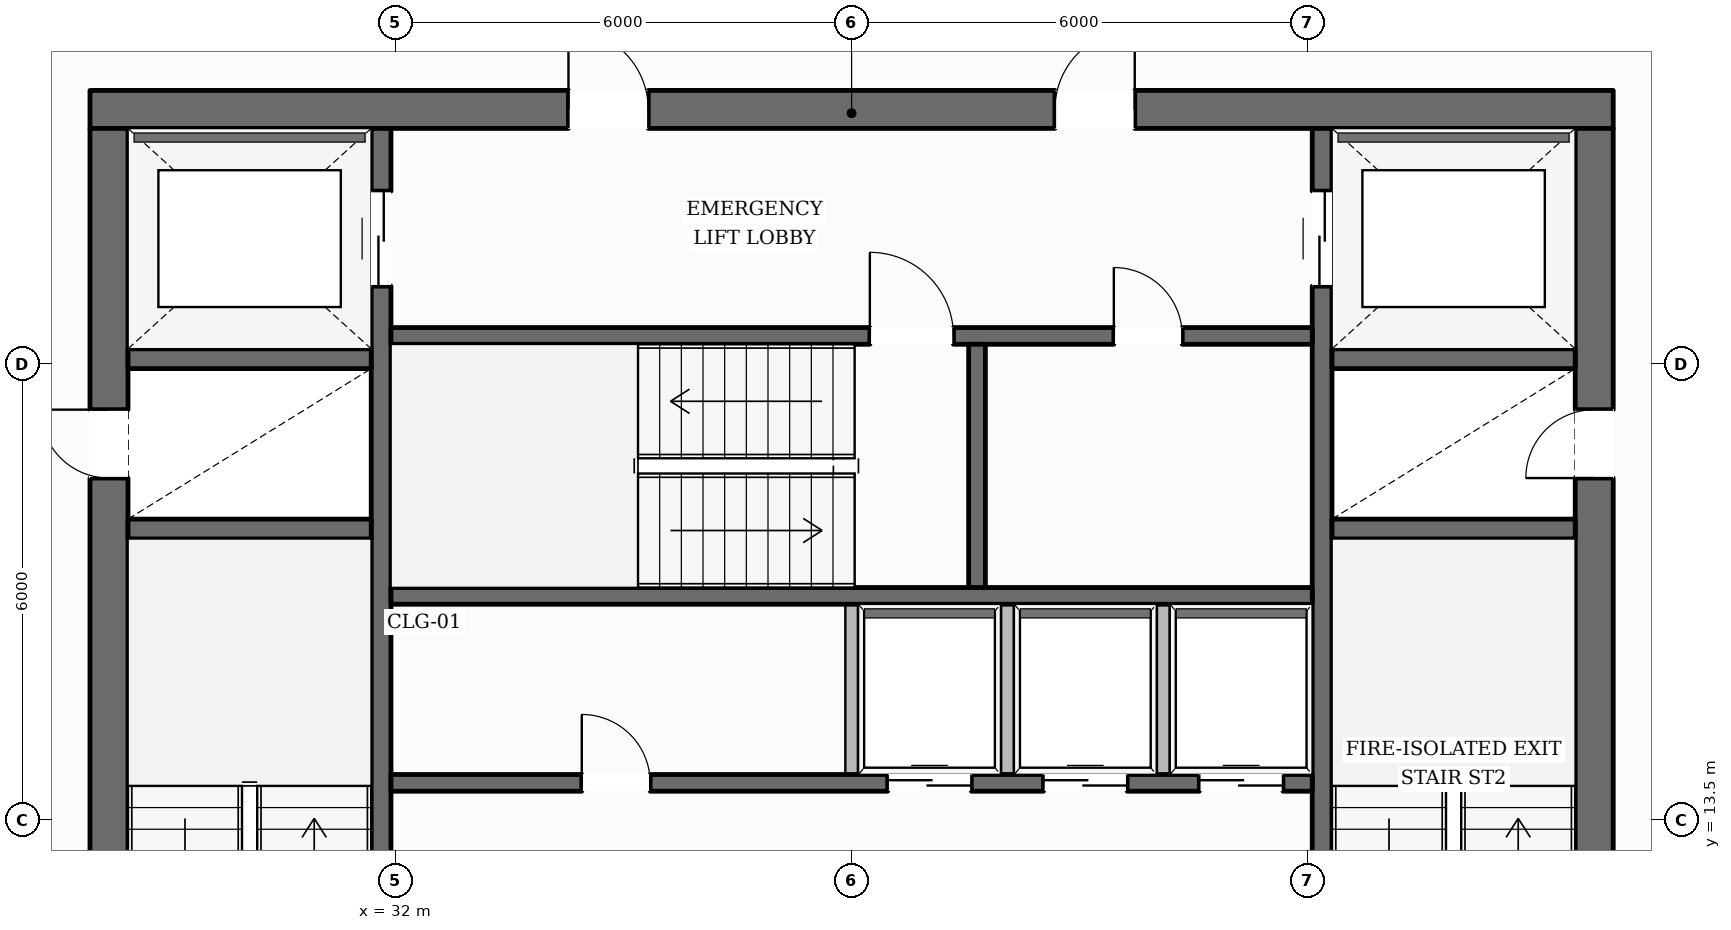
"""IFC4 building model, lengths in metres.
Left out: names, types, materials, properties, quantities, classifications, styles, units other than length and angle.
Written with IfcOpenShell. Run it as: python <this file> out.ifc"""

import sys

from ifc_helpers import new_model, si_unit, direction, frame, frame_2d, origin, place, context, subcontext, project, spatial, rectangle, extrude, element, fill, save


model = new_model("IFC4")
c1 = context("Model", 3, precision=1e-05, world=origin(), true_north=direction((0.0, 1.0)))
c2 = subcontext(c1, "Body", "Model", "MODEL_VIEW")
j1 = project(units=[si_unit("LENGTHUNIT", "METRE"), si_unit("PLANEANGLEUNIT", "RADIAN")], contexts=[c1])
p1 = place(None, origin())
s1 = spatial("IfcSite", under=j1, at=p1, CompositionType="ELEMENT")
p2 = place(p1, origin())
s2 = spatial("IfcBuilding", under=s1, at=p2, CompositionType="ELEMENT")
p3 = place(p2, frame((0.0, 0.0, 127.85)))
s3 = spatial("IfcBuildingStorey", under=s2, at=p3, CompositionType="ELEMENT", Elevation=127.85)
p4 = place(p3, frame((27.98, 22.85, 0.0), z_axis=(0.0, 0.0, 1.0), x_axis=(1.0, 0.0, 0.0)))
e1 = element("IfcWall", 1, at=p4, inside=s3, PredefinedType="SOLIDWALL", context=c2, shape_type="SweptSolid", body=[
    extrude(rectangle(XDim=20.04, YDim=0.5, at=frame_2d((10.02, 0.0))), origin(), (0.0, 0.0, 1.0), 3.6),
])
p5 = place(p4, frame((6.295, 0.0, 0.0)))
e2 = element("IfcOpeningElement", 2, at=p5, cuts=e1, PredefinedType="OPENING", context=c2, shape_type="SweptSolid", body=[
    extrude(rectangle(XDim=1.05, YDim=2.15, at=frame_2d((0.525, 1.075))), frame((0.0, 0.26, 0.0), z_axis=(0.0, -1.0, 0.0), x_axis=(1.0, 0.0, 0.0)), (0.0, 0.0, 1.0), 0.52),
])
p6 = place(p4, frame((12.695, 0.0, 0.0)))
e3 = element("IfcOpeningElement", 3, at=p6, cuts=e1, PredefinedType="OPENING", context=c2, shape_type="SweptSolid", body=[
    extrude(rectangle(XDim=1.05, YDim=2.15, at=frame_2d((0.525, 1.075))), frame((0.0, 0.26, 0.0), z_axis=(0.0, -1.0, 0.0), x_axis=(1.0, 0.0, 0.0)), (0.0, 0.0, 1.0), 0.52),
])
p7 = place(p3, frame((28.23, 9.6, 0.0), z_axis=(0.0, 0.0, 1.0), x_axis=(0.0, 1.0, 0.0)))
e4 = element("IfcWall", 4, at=p7, inside=s3, PredefinedType="SOLIDWALL", context=c2, shape_type="SweptSolid", body=[
    extrude(rectangle(XDim=13.0, YDim=0.5, at=frame_2d((6.5, 0.0))), origin(), (0.0, 0.0, 1.0), 3.6),
])
p8 = place(p7, frame((0.2, 0.0, 0.0)))
e5 = element("IfcOpeningElement", 5, at=p8, cuts=e4, PredefinedType="OPENING", context=c2, shape_type="SweptSolid", body=[
    extrude(rectangle(XDim=1.1, YDim=2.15, at=frame_2d((0.55, 1.075))), frame((0.0, 0.26, 0.0), z_axis=(0.0, -1.0, 0.0), x_axis=(1.0, 0.0, 0.0)), (0.0, 0.0, 1.0), 0.52),
])
p9 = place(p7, frame((8.4, 0.0, 0.0)))
e6 = element("IfcOpeningElement", 6, at=p9, cuts=e4, PredefinedType="OPENING", context=c2, shape_type="SweptSolid", body=[
    extrude(rectangle(XDim=0.9, YDim=2.1, at=frame_2d((0.45, 1.05))), frame((0.0, 0.26, 0.0), z_axis=(0.0, -1.0, 0.0), x_axis=(1.0, 0.0, 0.0)), (0.0, 0.0, 1.0), 0.52),
])
p10 = place(p3, frame((47.77, 9.6, 0.0), z_axis=(0.0, 0.0, 1.0), x_axis=(0.0, 1.0, 0.0)))
e7 = element("IfcWall", 7, at=p10, inside=s3, PredefinedType="SOLIDWALL", context=c2, shape_type="SweptSolid", body=[
    extrude(rectangle(XDim=13.0, YDim=0.5, at=frame_2d((6.5, 0.0))), origin(), (0.0, 0.0, 1.0), 3.6),
])
p11 = place(p10, frame((0.2, 0.0, 0.0)))
e8 = element("IfcOpeningElement", 8, at=p11, cuts=e7, PredefinedType="OPENING", context=c2, shape_type="SweptSolid", body=[
    extrude(rectangle(XDim=1.1, YDim=2.15, at=frame_2d((0.55, 1.075))), frame((0.0, 0.26, 0.0), z_axis=(0.0, -1.0, 0.0), x_axis=(1.0, 0.0, 0.0)), (0.0, 0.0, 1.0), 0.52),
])
p12 = place(p10, frame((8.4, 0.0, 0.0)))
e9 = element("IfcOpeningElement", 9, at=p12, cuts=e7, PredefinedType="OPENING", context=c2, shape_type="SweptSolid", body=[
    extrude(rectangle(XDim=0.9, YDim=2.1, at=frame_2d((0.45, 1.05))), frame((0.0, 0.26, 0.0), z_axis=(0.0, -1.0, 0.0), x_axis=(1.0, 0.0, 0.0)), (0.0, 0.0, 1.0), 0.52),
])
p13 = place(p3, frame((31.81, 9.6, 0.0), z_axis=(0.0, 0.0, 1.0), x_axis=(0.0, 1.0, 0.0)))
e10 = element("IfcWall", 10, at=p13, inside=s3, PredefinedType="SHEAR", context=c2, shape_type="SweptSolid", body=[
    extrude(rectangle(XDim=13.0, YDim=0.26, at=frame_2d((6.5, 0.0))), origin(), (0.0, 0.0, 1.0), 3.6),
])
p14 = place(p13, frame((10.925, 0.0, 0.0)))
e11 = element("IfcOpeningElement", 11, at=p14, cuts=e10, PredefinedType="OPENING", context=c2, shape_type="SweptSolid", body=[
    extrude(rectangle(XDim=1.25, YDim=2.25, at=frame_2d((0.625, 1.125))), frame((0.0, 0.14, 0.0), z_axis=(0.0, -1.0, 0.0), x_axis=(1.0, 0.0, 0.0)), (0.0, 0.0, 1.0), 0.28),
])
p15 = place(p3, frame((44.19, 9.6, 0.0), z_axis=(0.0, 0.0, 1.0), x_axis=(0.0, 1.0, 0.0)))
e12 = element("IfcWall", 12, at=p15, inside=s3, PredefinedType="SHEAR", context=c2, shape_type="SweptSolid", body=[
    extrude(rectangle(XDim=13.0, YDim=0.26, at=frame_2d((6.5, 0.0))), origin(), (0.0, 0.0, 1.0), 3.6),
])
p16 = place(p15, frame((10.925, 0.0, 0.0)))
e13 = element("IfcOpeningElement", 13, at=p16, cuts=e12, PredefinedType="OPENING", context=c2, shape_type="SweptSolid", body=[
    extrude(rectangle(XDim=1.25, YDim=2.25, at=frame_2d((0.625, 1.125))), frame((0.0, 0.14, 0.0), z_axis=(0.0, -1.0, 0.0), x_axis=(1.0, 0.0, 0.0)), (0.0, 0.0, 1.0), 0.28),
])
for number, where, z_axis, x_axis in (
    (14, (28.48, 17.33, 0.0), (0.0, 0.0, 1.0), (1.0, 0.0, 0.0)),
    (15, (28.48, 19.57, 0.0), (0.0, 0.0, 1.0), (1.0, 0.0, 0.0)),
    (16, (44.32, 17.33, 0.0), (0.0, 0.0, 1.0), (1.0, 0.0, 0.0)),
    (17, (44.32, 19.57, 0.0), (0.0, 0.0, 1.0), (1.0, 0.0, 0.0)),
):
    element("IfcWall", number, at=place(p3, frame(where, z_axis=z_axis, x_axis=x_axis)), inside=s3, PredefinedType="SHEAR", context=c2, shape_type="SweptSolid", body=[
        extrude(rectangle(XDim=3.2, YDim=0.26, at=frame_2d((1.6, 0.0))), origin(), (0.0, 0.0, 1.0), 3.6),
    ])
p17 = place(p3, frame((31.94, 19.87, 0.0), z_axis=(0.0, 0.0, 1.0), x_axis=(1.0, 0.0, 0.0)))
e18 = element("IfcWall", 18, at=p17, inside=s3, PredefinedType="SOLIDWALL", context=c2, shape_type="SweptSolid", body=[
    extrude(rectangle(XDim=12.12, YDim=0.22, at=frame_2d((6.06, 0.0))), origin(), (0.0, 0.0, 1.0), 3.6),
])
p18 = place(p17, frame((6.3, 0.0, 0.0)))
e19 = element("IfcOpeningElement", 19, at=p18, cuts=e18, PredefinedType="OPENING", context=c2, shape_type="SweptSolid", body=[
    extrude(rectangle(XDim=1.1, YDim=2.15, at=frame_2d((0.55, 1.075))), frame((0.0, 0.12, 0.0), z_axis=(0.0, -1.0, 0.0), x_axis=(1.0, 0.0, 0.0)), (0.0, 0.0, 1.0), 0.24),
])
p19 = place(p17, frame((9.51, 0.0, 0.0)))
e20 = element("IfcOpeningElement", 20, at=p19, cuts=e18, PredefinedType="OPENING", context=c2, shape_type="SweptSolid", body=[
    extrude(rectangle(XDim=0.9, YDim=2.1, at=frame_2d((0.45, 1.05))), frame((0.0, 0.12, 0.0), z_axis=(0.0, -1.0, 0.0), x_axis=(1.0, 0.0, 0.0)), (0.0, 0.0, 1.0), 0.24),
])
p20 = place(p3, frame((31.94, 16.45, 0.0), z_axis=(0.0, 0.0, 1.0), x_axis=(1.0, 0.0, 0.0)))
e21 = element("IfcWall", 21, at=p20, inside=s3, PredefinedType="SOLIDWALL", context=c2, shape_type="SweptSolid", body=[
    extrude(rectangle(XDim=12.12, YDim=0.22, at=frame_2d((6.06, 0.0))), origin(), (0.0, 0.0, 1.0), 3.6),
])
p21 = place(p3, frame((39.65, 16.56, 0.0), z_axis=(0.0, 0.0, 1.0), x_axis=(0.0, 1.0, 0.0)))
e22 = element("IfcWall", 22, at=p21, inside=s3, PredefinedType="SOLIDWALL", context=c2, shape_type="SweptSolid", body=[
    extrude(rectangle(XDim=3.2, YDim=0.22, at=frame_2d((1.6, 0.0))), origin(), (0.0, 0.0, 1.0), 3.6),
])
p22 = place(p3, frame((31.94, 13.99, 0.0), z_axis=(0.0, 0.0, 1.0), x_axis=(1.0, 0.0, 0.0)))
e23 = element("IfcWall", 23, at=p22, inside=s3, PredefinedType="SOLIDWALL", context=c2, shape_type="SweptSolid", body=[
    extrude(rectangle(XDim=12.12, YDim=0.22, at=frame_2d((6.06, 0.0))), origin(), (0.0, 0.0, 1.0), 3.6),
])
p23 = place(p22, frame((2.51, 0.0, 0.0)))
e24 = element("IfcOpeningElement", 24, at=p23, cuts=e23, PredefinedType="OPENING", context=c2, shape_type="SweptSolid", body=[
    extrude(rectangle(XDim=0.9, YDim=2.1, at=frame_2d((0.45, 1.05))), frame((0.0, 0.12, 0.0), z_axis=(0.0, -1.0, 0.0), x_axis=(1.0, 0.0, 0.0)), (0.0, 0.0, 1.0), 0.24),
])
p24 = place(p22, frame((6.535, 0.0, 0.0)))
e25 = element("IfcOpeningElement", 25, at=p24, cuts=e23, PredefinedType="OPENING", context=c2, shape_type="SweptSolid", body=[
    extrude(rectangle(XDim=1.1, YDim=2.2, at=frame_2d((0.55, 1.1))), frame((0.0, 0.12, 0.0), z_axis=(0.0, -1.0, 0.0), x_axis=(1.0, 0.0, 0.0)), (0.0, 0.0, 1.0), 0.24),
])
p25 = place(p22, frame((8.585, 0.0, 0.0)))
e26 = element("IfcOpeningElement", 26, at=p25, cuts=e23, PredefinedType="OPENING", context=c2, shape_type="SweptSolid", body=[
    extrude(rectangle(XDim=1.1, YDim=2.2, at=frame_2d((0.55, 1.1))), frame((0.0, 0.12, 0.0), z_axis=(0.0, -1.0, 0.0), x_axis=(1.0, 0.0, 0.0)), (0.0, 0.0, 1.0), 0.24),
])
p26 = place(p22, frame((10.635, 0.0, 0.0)))
e27 = element("IfcOpeningElement", 27, at=p26, cuts=e23, PredefinedType="OPENING", context=c2, shape_type="SweptSolid", body=[
    extrude(rectangle(XDim=1.1, YDim=2.2, at=frame_2d((0.55, 1.1))), frame((0.0, 0.12, 0.0), z_axis=(0.0, -1.0, 0.0), x_axis=(1.0, 0.0, 0.0)), (0.0, 0.0, 1.0), 0.24),
])
p27 = place(p3, frame((13.648, 12.443, 0.0), z_axis=(0.0, 0.0, 1.0), x_axis=(0.504070270963, 0.863662643589, 0.0)))
e28 = element("IfcWall", 28, at=p27, inside=s3, PredefinedType="STANDARD", context=c2, shape_type="SweptSolid", body=[
    extrude(rectangle(XDim=36.948, YDim=0.38, at=frame_2d((18.474, 0.0))), origin(), (0.0, 0.0, 1.0), 3.059),
])
p28 = place(p27, frame((27.111, 0.0, 0.0)))
e29 = element("IfcOpeningElement", 29, at=p28, cuts=e28, PredefinedType="OPENING", context=c2, shape_type="SweptSolid", body=[
    extrude(rectangle(XDim=1.0, YDim=2.2, at=frame_2d((0.5, 1.1))), frame((0.0, 0.2, 0.0), z_axis=(0.0, -1.0, 0.0), x_axis=(1.0, 0.0, 0.0)), (0.0, 0.0, 1.0), 0.4),
])
p29 = place(p27, frame((32.697, 0.0, 0.65)))
e30 = element("IfcOpeningElement", 30, at=p29, cuts=e28, PredefinedType="OPENING", context=c2, shape_type="SweptSolid", body=[
    extrude(rectangle(XDim=1.55, YDim=1.75, at=frame_2d((0.775, 0.875))), frame((0.0, 0.2, 0.0), z_axis=(0.0, -1.0, 0.0), x_axis=(1.0, 0.0, 0.0)), (0.0, 0.0, 1.0), 0.4),
])
p30 = place(p27, frame((20.7, 0.0, 0.65)))
e31 = element("IfcOpeningElement", 31, at=p30, cuts=e28, PredefinedType="OPENING", context=c2, shape_type="SweptSolid", body=[
    extrude(rectangle(XDim=1.55, YDim=1.75, at=frame_2d((0.775, 0.875))), frame((0.0, 0.2, 0.0), z_axis=(0.0, -1.0, 0.0), x_axis=(1.0, 0.0, 0.0)), (0.0, 0.0, 1.0), 0.4),
])
p31 = place(p27, frame((8.704, 0.0, 0.65)))
e32 = element("IfcOpeningElement", 32, at=p31, cuts=e28, PredefinedType="OPENING", context=c2, shape_type="SweptSolid", body=[
    extrude(rectangle(XDim=1.55, YDim=1.75, at=frame_2d((0.775, 0.875))), frame((0.0, 0.2, 0.0), z_axis=(0.0, -1.0, 0.0), x_axis=(1.0, 0.0, 0.0)), (0.0, 0.0, 1.0), 0.4),
])
p32 = place(p27, frame((2.705, 0.0, 0.65)))
e33 = element("IfcOpeningElement", 33, at=p32, cuts=e28, PredefinedType="OPENING", context=c2, shape_type="SweptSolid", body=[
    extrude(rectangle(XDim=1.55, YDim=1.75, at=frame_2d((0.775, 0.875))), frame((0.0, 0.2, 0.0), z_axis=(0.0, -1.0, 0.0), x_axis=(1.0, 0.0, 0.0)), (0.0, 0.0, 1.0), 0.4),
])
p33 = place(p3, frame((43.789, 44.317, 0.0), z_axis=(0.0, 0.0, 1.0), x_axis=(0.506589674511, -0.862187277613, 0.0)))
e34 = element("IfcWall", 34, at=p33, inside=s3, PredefinedType="STANDARD", context=c2, shape_type="SweptSolid", body=[
    extrude(rectangle(XDim=37.135, YDim=0.38, at=frame_2d((18.568, 0.0))), origin(), (0.0, 0.0, 1.0), 3.059),
])
p34 = place(p33, frame((27.252, 0.0, 0.0)))
e35 = element("IfcOpeningElement", 35, at=p34, cuts=e34, PredefinedType="OPENING", context=c2, shape_type="SweptSolid", body=[
    extrude(rectangle(XDim=1.0, YDim=2.2, at=frame_2d((0.5, 1.1))), frame((0.0, 0.2, 0.0), z_axis=(0.0, -1.0, 0.0), x_axis=(1.0, 0.0, 0.0)), (0.0, 0.0, 1.0), 0.4),
])
p35 = place(p33, frame((32.865, 0.0, 0.65)))
e36 = element("IfcOpeningElement", 36, at=p35, cuts=e34, PredefinedType="OPENING", context=c2, shape_type="SweptSolid", body=[
    extrude(rectangle(XDim=1.55, YDim=1.75, at=frame_2d((0.775, 0.875))), frame((0.0, 0.2, 0.0), z_axis=(0.0, -1.0, 0.0), x_axis=(1.0, 0.0, 0.0)), (0.0, 0.0, 1.0), 0.4),
])
p36 = place(p33, frame((20.804, 0.0, 0.65)))
e37 = element("IfcOpeningElement", 37, at=p36, cuts=e34, PredefinedType="OPENING", context=c2, shape_type="SweptSolid", body=[
    extrude(rectangle(XDim=1.55, YDim=1.75, at=frame_2d((0.775, 0.875))), frame((0.0, 0.2, 0.0), z_axis=(0.0, -1.0, 0.0), x_axis=(1.0, 0.0, 0.0)), (0.0, 0.0, 1.0), 0.4),
])
p37 = place(p33, frame((8.744, 0.0, 0.65)))
e38 = element("IfcOpeningElement", 38, at=p37, cuts=e34, PredefinedType="OPENING", context=c2, shape_type="SweptSolid", body=[
    extrude(rectangle(XDim=1.55, YDim=1.75, at=frame_2d((0.775, 0.875))), frame((0.0, 0.2, 0.0), z_axis=(0.0, -1.0, 0.0), x_axis=(1.0, 0.0, 0.0)), (0.0, 0.0, 1.0), 0.4),
])
p38 = place(p33, frame((2.714, 0.0, 0.65)))
e39 = element("IfcOpeningElement", 39, at=p38, cuts=e34, PredefinedType="OPENING", context=c2, shape_type="SweptSolid", body=[
    extrude(rectangle(XDim=1.55, YDim=1.75, at=frame_2d((0.775, 0.875))), frame((0.0, 0.2, 0.0), z_axis=(0.0, -1.0, 0.0), x_axis=(1.0, 0.0, 0.0)), (0.0, 0.0, 1.0), 0.4),
])
for number, where, z_axis, x_axis in (
    (40, (38.0, 14.1, 0.0), (0.0, 0.0, 1.0), (0.0, 1.0, 0.0)),
    (41, (40.05, 14.1, 0.0), (0.0, 0.0, 1.0), (0.0, 1.0, 0.0)),
    (42, (42.1, 14.1, 0.0), (0.0, 0.0, 1.0), (0.0, 1.0, 0.0)),
):
    element("IfcWall", number, at=place(p3, frame(where, z_axis=z_axis, x_axis=x_axis)), inside=s3, PredefinedType="PARTITIONING", context=c2, shape_type="SweptSolid", body=[
        extrude(rectangle(XDim=2.24, YDim=0.165, at=frame_2d((1.12, 0.0))), origin(), (0.0, 0.0, 1.0), 3.6),
    ])
p39 = place(p18, origin())
e43 = element("IfcDoor", 43, at=p39, inside=s3, OperationType="SINGLE_SWING_LEFT", PredefinedType="DOOR", context=c2, shape_type="SweptSolid", body=[
    extrude(rectangle(XDim=1.1, YDim=2.15, at=frame_2d((0.55, 1.075))), frame((0.0, 0.025, 0.0), z_axis=(0.0, -1.0, 0.0), x_axis=(1.0, 0.0, 0.0)), (0.0, 0.0, 1.0), 0.05),
])
fill(e19, e43)
p40 = place(p9, origin())
e44 = element("IfcDoor", 44, at=p40, inside=s3, OperationType="SINGLE_SWING_RIGHT", PredefinedType="DOOR", context=c2, shape_type="SweptSolid", body=[
    extrude(rectangle(XDim=0.9, YDim=2.1, at=frame_2d((0.45, 1.05))), frame((0.0, 0.025, 0.0), z_axis=(0.0, -1.0, 0.0), x_axis=(1.0, 0.0, 0.0)), (0.0, 0.0, 1.0), 0.05),
])
fill(e6, e44)
p41 = place(p12, origin())
e45 = element("IfcDoor", 45, at=p41, inside=s3, OperationType="SINGLE_SWING_LEFT", PredefinedType="DOOR", context=c2, shape_type="SweptSolid", body=[
    extrude(rectangle(XDim=0.9, YDim=2.1, at=frame_2d((0.45, 1.05))), frame((0.0, 0.025, 0.0), z_axis=(0.0, -1.0, 0.0), x_axis=(1.0, 0.0, 0.0)), (0.0, 0.0, 1.0), 0.05),
])
fill(e9, e45)
p42 = place(p5, origin())
e46 = element("IfcDoor", 46, at=p42, inside=s3, OperationType="SINGLE_SWING_LEFT", PredefinedType="DOOR", context=c2, shape_type="SweptSolid", body=[
    extrude(rectangle(XDim=1.05, YDim=2.15, at=frame_2d((0.525, 1.075))), frame((0.0, 0.025, 0.0), z_axis=(0.0, -1.0, 0.0), x_axis=(1.0, 0.0, 0.0)), (0.0, 0.0, 1.0), 0.05),
])
fill(e2, e46)
p43 = place(p6, origin())
e47 = element("IfcDoor", 47, at=p43, inside=s3, OperationType="SINGLE_SWING_RIGHT", PredefinedType="DOOR", context=c2, shape_type="SweptSolid", body=[
    extrude(rectangle(XDim=1.05, YDim=2.15, at=frame_2d((0.525, 1.075))), frame((0.0, 0.025, 0.0), z_axis=(0.0, -1.0, 0.0), x_axis=(1.0, 0.0, 0.0)), (0.0, 0.0, 1.0), 0.05),
])
fill(e3, e47)
p44 = place(p14, origin())
e48 = element("IfcDoor", 48, at=p44, inside=s3, OperationType="DOUBLE_DOOR_SLIDING", PredefinedType="DOOR", context=c2, shape_type="SweptSolid", body=[
    extrude(rectangle(XDim=1.25, YDim=2.25, at=frame_2d((0.625, 1.125))), frame((0.0, 0.025, 0.0), z_axis=(0.0, -1.0, 0.0), x_axis=(1.0, 0.0, 0.0)), (0.0, 0.0, 1.0), 0.05),
])
fill(e11, e48)
p45 = place(p16, origin())
e49 = element("IfcDoor", 49, at=p45, inside=s3, OperationType="DOUBLE_DOOR_SLIDING", PredefinedType="DOOR", context=c2, shape_type="SweptSolid", body=[
    extrude(rectangle(XDim=1.25, YDim=2.25, at=frame_2d((0.625, 1.125))), frame((0.0, 0.025, 0.0), z_axis=(0.0, -1.0, 0.0), x_axis=(1.0, 0.0, 0.0)), (0.0, 0.0, 1.0), 0.05),
])
fill(e13, e49)
p46 = place(p23, origin())
e50 = element("IfcDoor", 50, at=p46, inside=s3, OperationType="SINGLE_SWING_LEFT", PredefinedType="DOOR", context=c2, shape_type="SweptSolid", body=[
    extrude(rectangle(XDim=0.9, YDim=2.1, at=frame_2d((0.45, 1.05))), frame((0.0, 0.025, 0.0), z_axis=(0.0, -1.0, 0.0), x_axis=(1.0, 0.0, 0.0)), (0.0, 0.0, 1.0), 0.05),
])
fill(e24, e50)
p47 = place(p24, origin())
e51 = element("IfcDoor", 51, at=p47, inside=s3, OperationType="DOUBLE_DOOR_SLIDING", PredefinedType="DOOR", context=c2, shape_type="SweptSolid", body=[
    extrude(rectangle(XDim=1.1, YDim=2.2, at=frame_2d((0.55, 1.1))), frame((0.0, 0.025, 0.0), z_axis=(0.0, -1.0, 0.0), x_axis=(1.0, 0.0, 0.0)), (0.0, 0.0, 1.0), 0.05),
])
fill(e25, e51)
p48 = place(p25, origin())
e52 = element("IfcDoor", 52, at=p48, inside=s3, OperationType="DOUBLE_DOOR_SLIDING", PredefinedType="DOOR", context=c2, shape_type="SweptSolid", body=[
    extrude(rectangle(XDim=1.1, YDim=2.2, at=frame_2d((0.55, 1.1))), frame((0.0, 0.025, 0.0), z_axis=(0.0, -1.0, 0.0), x_axis=(1.0, 0.0, 0.0)), (0.0, 0.0, 1.0), 0.05),
])
fill(e26, e52)
p49 = place(p26, origin())
e53 = element("IfcDoor", 53, at=p49, inside=s3, OperationType="DOUBLE_DOOR_SLIDING", PredefinedType="DOOR", context=c2, shape_type="SweptSolid", body=[
    extrude(rectangle(XDim=1.1, YDim=2.2, at=frame_2d((0.55, 1.1))), frame((0.0, 0.025, 0.0), z_axis=(0.0, -1.0, 0.0), x_axis=(1.0, 0.0, 0.0)), (0.0, 0.0, 1.0), 0.05),
])
fill(e27, e53)
p50 = place(p19, origin())
e54 = element("IfcDoor", 54, at=p50, inside=s3, OperationType="SINGLE_SWING_LEFT", PredefinedType="DOOR", context=c2, shape_type="SweptSolid", body=[
    extrude(rectangle(XDim=0.9, YDim=2.1, at=frame_2d((0.45, 1.05))), frame((0.0, 0.025, 0.0), z_axis=(0.0, -1.0, 0.0), x_axis=(1.0, 0.0, 0.0)), (0.0, 0.0, 1.0), 0.05),
])
fill(e20, e54)
save(model, sys.argv[1])
